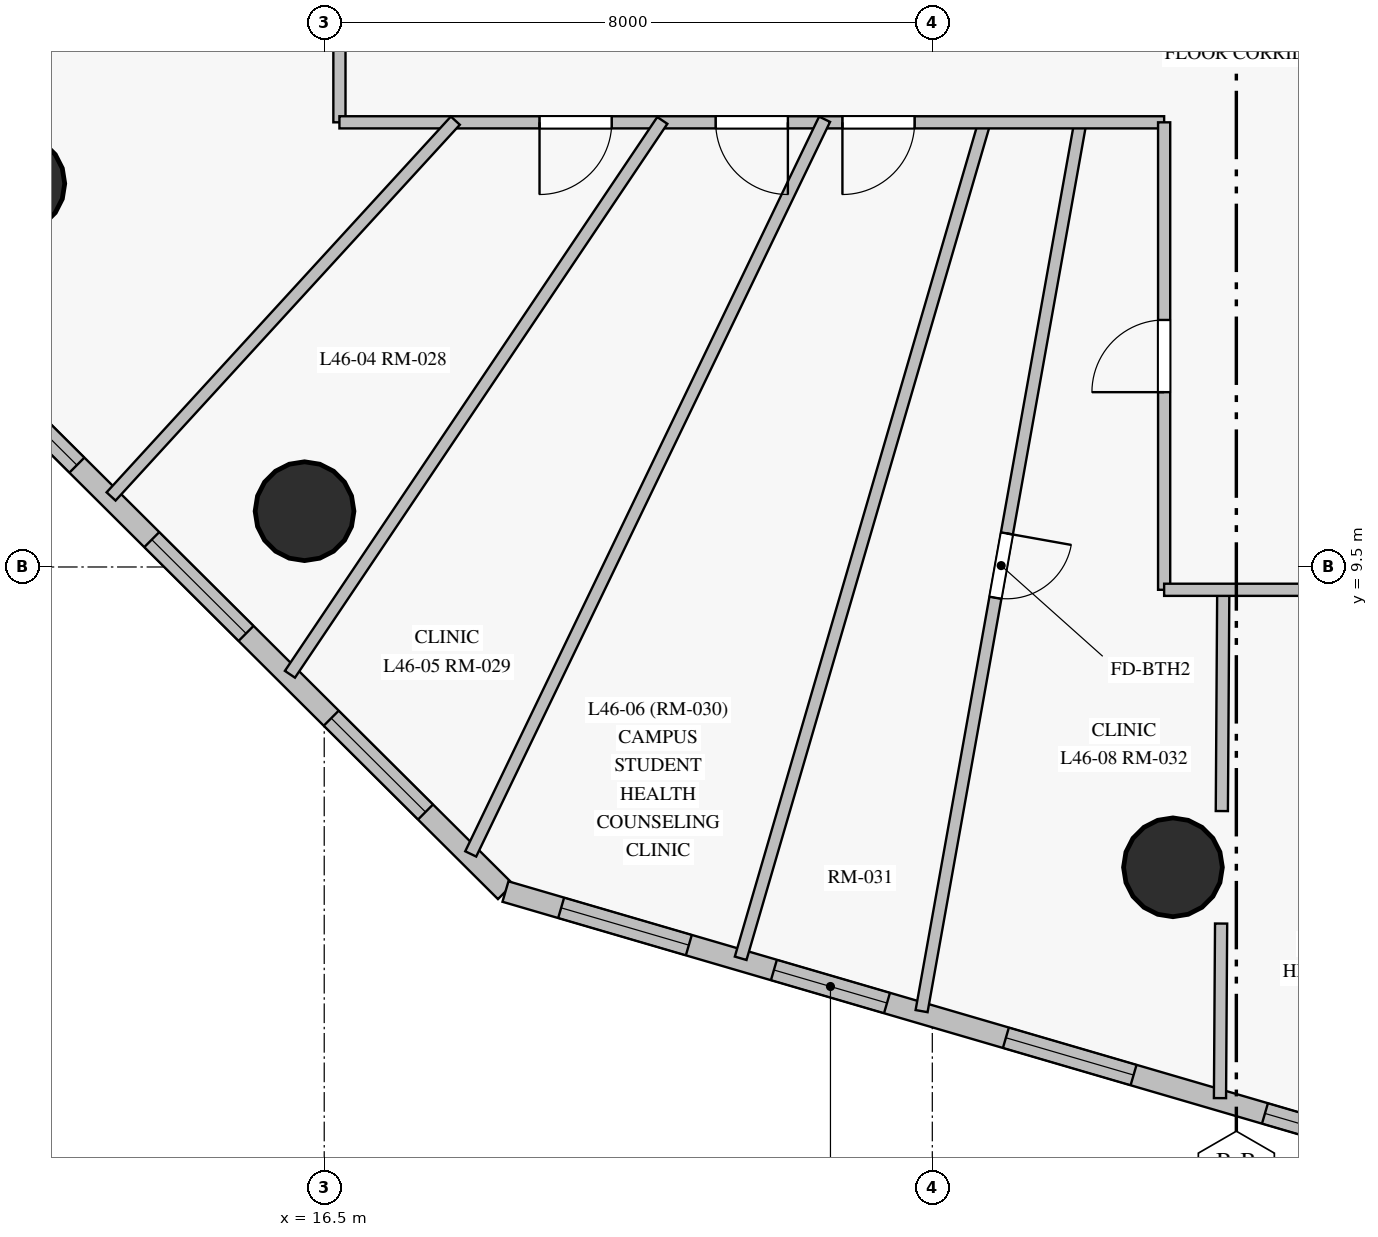
"""IFC4 building model, lengths in metres.
Left out: names, types, materials, properties, quantities, classifications, styles, units other than length and angle.
Written with IfcOpenShell. Run it as: python <this file> out.ifc"""

import sys

from ifc_helpers import new_model, si_unit, direction, frame, frame_2d, origin, origin_with_axes, origin_2d, place, context, subcontext, project, spatial, rectangle, circle, extrude, source, transform, mapped, element, fill, save


model = new_model("IFC4")
c1 = context("Model", 3, precision=1e-05, world=origin(), true_north=direction((0.0, 1.0)))
c2 = subcontext(c1, "Body", "Model", "MODEL_VIEW")
j1 = project(units=[si_unit("LENGTHUNIT", "METRE"), si_unit("PLANEANGLEUNIT", "RADIAN")], contexts=[c1])
p1 = place(None, origin())
s1 = spatial("IfcSite", under=j1, at=p1, CompositionType="ELEMENT")
p2 = place(p1, origin())
s2 = spatial("IfcBuilding", under=s1, at=p2, CompositionType="ELEMENT")
p3 = place(p2, frame((0.0, 0.0, 162.65)))
s3 = spatial("IfcBuildingStorey", under=s2, at=p3, CompositionType="ELEMENT", Elevation=162.65)
m1 = source(origin_with_axes(), c2, "Body", "SweptSolid", [
    extrude(circle(Radius=0.65, at=origin_2d()), origin(), (0.0, 0.0, 1.0), 3.05),
])
for number, where, z_axis, x_axis in (
    (1, (12.436, 14.544, 0.0), (0.0, 0.0, 1.0), (1.0, 0.0, 0.0)),
    (2, (16.241, 10.234, 0.0), (0.0, 0.0, 1.0), (1.0, 0.0, 0.0)),
    (3, (27.666, 5.549, 0.0), (0.0, 0.0, 1.0), (1.0, 0.0, 0.0)),
):
    element("IfcColumn", number, at=place(p3, frame(where, z_axis=z_axis, x_axis=x_axis)), inside=s3, PredefinedType="COLUMN", context=c2, shape_type="MappedRepresentation", body=[
        mapped(m1, transform((0.0, 0.0, 0.0), scale=1.0)),
    ])
p4 = place(p3, frame((12.099, 11.981, 0.0), z_axis=(0.0, 0.0, 1.0), x_axis=(0.708877198621, -0.705331919932, 0.0)))
e4 = element("IfcWall", 4, at=p4, inside=s3, PredefinedType="SOLIDWALL", context=c2, shape_type="SweptSolid", body=[
    extrude(rectangle(XDim=9.572, YDim=0.28, at=frame_2d((4.786, 0.0))), origin(), (0.0, 0.0, 1.0), 2.825),
])
p5 = place(p4, frame((0.668, 0.0, 0.85)))
e5 = element("IfcOpeningElement", 5, at=p5, cuts=e4, PredefinedType="OPENING", context=c2, shape_type="SweptSolid", body=[
    extrude(rectangle(XDim=0.95, YDim=1.5, at=frame_2d((0.475, 0.75))), frame((0.0, 0.15, 0.0), z_axis=(0.0, -1.0, 0.0), x_axis=(1.0, 0.0, 0.0)), (0.0, 0.0, 1.0), 0.3),
])
p6 = place(p4, frame((3.008, 0.0, 0.85)))
e6 = element("IfcOpeningElement", 6, at=p6, cuts=e4, PredefinedType="OPENING", context=c2, shape_type="SweptSolid", body=[
    extrude(rectangle(XDim=1.75, YDim=1.65, at=frame_2d((0.875, 0.825))), frame((0.0, 0.15, 0.0), z_axis=(0.0, -1.0, 0.0), x_axis=(1.0, 0.0, 0.0)), (0.0, 0.0, 1.0), 0.3),
])
p7 = place(p4, frame((6.338, 0.0, 0.85)))
e7 = element("IfcOpeningElement", 7, at=p7, cuts=e4, PredefinedType="OPENING", context=c2, shape_type="SweptSolid", body=[
    extrude(rectangle(XDim=1.75, YDim=1.65, at=frame_2d((0.875, 0.825))), frame((0.0, 0.15, 0.0), z_axis=(0.0, -1.0, 0.0), x_axis=(1.0, 0.0, 0.0)), (0.0, 0.0, 1.0), 0.3),
])
p8 = place(p3, frame((18.885, 5.23, 0.0), z_axis=(0.0, 0.0, 1.0), x_axis=(0.959880587049, -0.280409091519, 0.0)))
e8 = element("IfcWall", 8, at=p8, inside=s3, PredefinedType="SOLIDWALL", context=c2, shape_type="SweptSolid", body=[
    extrude(rectangle(XDim=12.053, YDim=0.28, at=frame_2d((6.027, 0.0))), origin(), (0.0, 0.0, 1.0), 2.825),
])
p9 = place(p8, frame((0.763, 0.0, 0.85)))
e9 = element("IfcOpeningElement", 9, at=p9, cuts=e8, PredefinedType="OPENING", context=c2, shape_type="SweptSolid", body=[
    extrude(rectangle(XDim=1.75, YDim=1.65, at=frame_2d((0.875, 0.825))), frame((0.0, 0.15, 0.0), z_axis=(0.0, -1.0, 0.0), x_axis=(1.0, 0.0, 0.0)), (0.0, 0.0, 1.0), 0.3),
])
p10 = place(p8, frame((3.679, 0.0, 0.85)))
e10 = element("IfcOpeningElement", 10, at=p10, cuts=e8, PredefinedType="OPENING", context=c2, shape_type="SweptSolid", body=[
    extrude(rectangle(XDim=1.55, YDim=1.65, at=frame_2d((0.775, 0.825))), frame((0.0, 0.15, 0.0), z_axis=(0.0, -1.0, 0.0), x_axis=(1.0, 0.0, 0.0)), (0.0, 0.0, 1.0), 0.3),
])
p11 = place(p8, frame((6.859, 0.0, 0.85)))
e11 = element("IfcOpeningElement", 11, at=p11, cuts=e8, PredefinedType="OPENING", context=c2, shape_type="SweptSolid", body=[
    extrude(rectangle(XDim=1.75, YDim=1.65, at=frame_2d((0.875, 0.825))), frame((0.0, 0.15, 0.0), z_axis=(0.0, -1.0, 0.0), x_axis=(1.0, 0.0, 0.0)), (0.0, 0.0, 1.0), 0.3),
])
p12 = place(p8, frame((10.409, 0.0, 0.85)))
e12 = element("IfcOpeningElement", 12, at=p12, cuts=e8, PredefinedType="OPENING", context=c2, shape_type="SweptSolid", body=[
    extrude(rectangle(XDim=0.95, YDim=1.5, at=frame_2d((0.475, 0.75))), frame((0.0, 0.15, 0.0), z_axis=(0.0, -1.0, 0.0), x_axis=(1.0, 0.0, 0.0)), (0.0, 0.0, 1.0), 0.3),
])
p13 = place(p3, frame((16.7, 15.35, 0.0), z_axis=(0.0, 0.0, 1.0), x_axis=(0.0, 1.0, 0.0)))
e13 = element("IfcWall", 13, at=p13, inside=s3, PredefinedType="PARTITIONING", context=c2, shape_type="SweptSolid", body=[
    extrude(rectangle(XDim=22.3, YDim=0.16, at=frame_2d((11.15, 0.0))), origin(), (0.0, 0.0, 1.0), 2.275),
])
p14 = place(p13, frame((11.715, 0.0, 0.0)))
e14 = element("IfcOpeningElement", 14, at=p14, cuts=e13, PredefinedType="OPENING", context=c2, shape_type="SweptSolid", body=[
    extrude(rectangle(XDim=0.95, YDim=2.15, at=frame_2d((0.475, 1.075))), frame((0.0, 0.09, 0.0), z_axis=(0.0, -1.0, 0.0), x_axis=(1.0, 0.0, 0.0)), (0.0, 0.0, 1.0), 0.18),
])
p15 = place(p13, frame((7.33, 0.0, 0.0)))
e15 = element("IfcOpeningElement", 15, at=p15, cuts=e13, PredefinedType="OPENING", context=c2, shape_type="SweptSolid", body=[
    extrude(rectangle(XDim=0.96, YDim=2.15, at=frame_2d((0.48, 1.075))), frame((0.0, 0.09, 0.0), z_axis=(0.0, -1.0, 0.0), x_axis=(1.0, 0.0, 0.0)), (0.0, 0.0, 1.0), 0.18),
])
p16 = place(p13, frame((4.61, 0.0, 0.0)))
e16 = element("IfcOpeningElement", 16, at=p16, cuts=e13, PredefinedType="OPENING", context=c2, shape_type="SweptSolid", body=[
    extrude(rectangle(XDim=0.95, YDim=2.15, at=frame_2d((0.475, 1.075))), frame((0.0, 0.09, 0.0), z_axis=(0.0, -1.0, 0.0), x_axis=(1.0, 0.0, 0.0)), (0.0, 0.0, 1.0), 0.18),
])
p17 = place(p13, frame((16.99, 0.0, 0.0)))
e17 = element("IfcOpeningElement", 17, at=p17, cuts=e13, PredefinedType="OPENING", context=c2, shape_type="SweptSolid", body=[
    extrude(rectangle(XDim=0.95, YDim=2.15, at=frame_2d((0.475, 1.075))), frame((0.0, 0.09, 0.0), z_axis=(0.0, -1.0, 0.0), x_axis=(1.0, 0.0, 0.0)), (0.0, 0.0, 1.0), 0.18),
])
p18 = place(p13, frame((14.56, 0.0, 0.0)))
e18 = element("IfcOpeningElement", 18, at=p18, cuts=e13, PredefinedType="OPENING", context=c2, shape_type="SweptSolid", body=[
    extrude(rectangle(XDim=0.95, YDim=2.15, at=frame_2d((0.475, 1.075))), frame((0.0, 0.09, 0.0), z_axis=(0.0, -1.0, 0.0), x_axis=(1.0, 0.0, 0.0)), (0.0, 0.0, 1.0), 0.18),
])
p19 = place(p13, frame((13.43, 0.0, 0.0)))
e19 = element("IfcOpeningElement", 19, at=p19, cuts=e13, PredefinedType="OPENING", context=c2, shape_type="SweptSolid", body=[
    extrude(rectangle(XDim=0.95, YDim=2.15, at=frame_2d((0.475, 1.075))), frame((0.0, 0.09, 0.0), z_axis=(0.0, -1.0, 0.0), x_axis=(1.0, 0.0, 0.0)), (0.0, 0.0, 1.0), 0.18),
])
p20 = place(p3, frame((26.453, 15.379, 0.0), z_axis=(0.0, 0.0, 1.0), x_axis=(-0.175848115547, -0.984417310016, 0.0)))
e20 = element("IfcWall", 20, at=p20, inside=s3, PredefinedType="PARTITIONING", context=c2, shape_type="SweptSolid", body=[
    extrude(rectangle(XDim=11.908, YDim=0.16, at=frame_2d((5.954, 0.0))), origin(), (0.0, 0.0, 1.0), 2.275),
])
p21 = place(p20, frame((5.524, 0.0, 0.0)))
e21 = element("IfcOpeningElement", 21, at=p21, cuts=e20, PredefinedType="OPENING", context=c2, shape_type="SweptSolid", body=[
    extrude(rectangle(XDim=0.86, YDim=2.04, at=frame_2d((0.43, 1.02))), frame((0.0, 0.09, 0.0), z_axis=(0.0, -1.0, 0.0), x_axis=(1.0, 0.0, 0.0)), (0.0, 0.0, 1.0), 0.18),
])
p22 = place(p3, frame((25.194, 15.379, 0.0), z_axis=(0.0, 0.0, 1.0), x_axis=(-0.279952660007, -0.960013806231, 0.0)))
e22 = element("IfcWall", 22, at=p22, inside=s3, PredefinedType="PARTITIONING", context=c2, shape_type="SweptSolid", body=[
    extrude(rectangle(XDim=11.486, YDim=0.16, at=frame_2d((5.743, 0.0))), origin(), (0.0, 0.0, 1.0), 2.825),
])
p23 = place(p3, frame((27.55, 15.35, 0.0), z_axis=(0.0, 0.0, 1.0), x_axis=(-1.0, 0.0, 0.0)))
e23 = element("IfcWall", 23, at=p23, inside=s3, PredefinedType="PARTITIONING", context=c2, shape_type="SweptSolid", body=[
    extrude(rectangle(XDim=10.85, YDim=0.16, at=frame_2d((5.425, 0.0))), origin(), (0.0, 0.0, 1.0), 2.375),
])
p24 = place(p23, frame((7.268, 0.0, 0.0)))
e24 = element("IfcOpeningElement", 24, at=p24, cuts=e23, PredefinedType="OPENING", context=c2, shape_type="SweptSolid", body=[
    extrude(rectangle(XDim=0.95, YDim=2.15, at=frame_2d((0.475, 1.075))), frame((0.0, 0.09, 0.0), z_axis=(0.0, -1.0, 0.0), x_axis=(1.0, 0.0, 0.0)), (0.0, 0.0, 1.0), 0.18),
])
p25 = place(p23, frame((4.95, 0.0, 0.0)))
e25 = element("IfcOpeningElement", 25, at=p25, cuts=e23, PredefinedType="OPENING", context=c2, shape_type="SweptSolid", body=[
    extrude(rectangle(XDim=0.95, YDim=2.15, at=frame_2d((0.475, 1.075))), frame((0.0, 0.09, 0.0), z_axis=(0.0, -1.0, 0.0), x_axis=(1.0, 0.0, 0.0)), (0.0, 0.0, 1.0), 0.18),
])
p26 = place(p23, frame((3.282, 0.0, 0.0)))
e26 = element("IfcOpeningElement", 26, at=p26, cuts=e23, PredefinedType="OPENING", context=c2, shape_type="SweptSolid", body=[
    extrude(rectangle(XDim=0.95, YDim=2.15, at=frame_2d((0.475, 1.075))), frame((0.0, 0.09, 0.0), z_axis=(0.0, -1.0, 0.0), x_axis=(1.0, 0.0, 0.0)), (0.0, 0.0, 1.0), 0.18),
])
p27 = place(p3, frame((23.083, 15.39, 0.0), z_axis=(0.0, 0.0, 1.0), x_axis=(-0.433938094177, -0.900942689866, 0.0)))
e27 = element("IfcWall", 27, at=p27, inside=s3, PredefinedType="PARTITIONING", context=c2, shape_type="SweptSolid", body=[
    extrude(rectangle(XDim=10.728, YDim=0.16, at=frame_2d((5.364, 0.0))), origin(), (0.0, 0.0, 1.0), 2.825),
])
p28 = place(p3, frame((20.948, 15.375, 0.0), z_axis=(0.0, 0.0, 1.0), x_axis=(-0.557961935119, -0.82986654286, 0.0)))
e28 = element("IfcWall", 28, at=p28, inside=s3, PredefinedType="PARTITIONING", context=c2, shape_type="SweptSolid", body=[
    extrude(rectangle(XDim=8.781, YDim=0.16, at=frame_2d((4.39, 0.0))), origin(), (0.0, 0.0, 1.0), 2.825),
])
p29 = place(p3, frame((18.225, 15.372, 0.0), z_axis=(0.0, 0.0, 1.0), x_axis=(-0.675498710577, -0.737361167955, 0.0)))
e29 = element("IfcWall", 29, at=p29, inside=s3, PredefinedType="PARTITIONING", context=c2, shape_type="SweptSolid", body=[
    extrude(rectangle(XDim=6.705, YDim=0.16, at=frame_2d((3.353, 0.0))), origin(), (0.0, 0.0, 1.0), 2.275),
])
p30 = place(p3, frame((27.55, 9.2, 0.0), z_axis=(0.0, 0.0, 1.0), x_axis=(0.0, 1.0, 0.0)))
e30 = element("IfcWall", 30, at=p30, inside=s3, PredefinedType="PARTITIONING", context=c2, shape_type="SweptSolid", body=[
    extrude(rectangle(XDim=6.15, YDim=0.16, at=frame_2d((3.075, 0.0))), origin(), (0.0, 0.0, 1.0), 2.275),
])
p31 = place(p30, frame((2.6, 0.0, 0.0)))
e31 = element("IfcOpeningElement", 31, at=p31, cuts=e30, PredefinedType="OPENING", context=c2, shape_type="SweptSolid", body=[
    extrude(rectangle(XDim=0.95, YDim=2.15, at=frame_2d((0.475, 1.075))), frame((0.0, 0.09, 0.0), z_axis=(0.0, -1.0, 0.0), x_axis=(1.0, 0.0, 0.0)), (0.0, 0.0, 1.0), 0.18),
])
p32 = place(p3, frame((28.328, 9.23, 0.0), z_axis=(0.0, 0.0, 1.0), x_axis=(-0.006475042741, -0.999979036691, 0.0)))
e32 = element("IfcWall", 32, at=p32, inside=s3, PredefinedType="PARTITIONING", context=c2, shape_type="SweptSolid", body=[
    extrude(rectangle(XDim=2.941, YDim=0.16, at=frame_2d((1.47, 0.0))), origin(), (0.0, 0.0, 1.0), 2.825),
])
p33 = place(p3, frame((28.3, 4.809, 0.0), z_axis=(0.0, 0.0, 1.0), x_axis=(-0.006484396464, -0.99997897608, 0.0)))
e33 = element("IfcWall", 33, at=p33, inside=s3, PredefinedType="PARTITIONING", context=c2, shape_type="SweptSolid", body=[
    extrude(rectangle(XDim=2.297, YDim=0.16, at=frame_2d((1.148, 0.0))), origin(), (0.0, 0.0, 1.0), 2.825),
])
p34 = place(p3, frame((29.55, 9.2, 0.0), z_axis=(0.0, 0.0, 1.0), x_axis=(-1.0, 0.0, 0.0)))
e34 = element("IfcWall", 34, at=p34, inside=s3, PredefinedType="PARTITIONING", context=c2, shape_type="SweptSolid", body=[
    extrude(rectangle(XDim=2.0, YDim=0.16, at=frame_2d((1.0, 0.0))), origin(), (0.0, 0.0, 1.0), 2.495),
])
m2 = source(origin_with_axes(), c2, "Body", "SweptSolid", [
    extrude(rectangle(XDim=0.95, YDim=1.5, at=frame_2d((0.475, 0.75))), frame((0.0, 0.03, 0.0), z_axis=(0.0, -1.0, 0.0), x_axis=(1.0, 0.0, 0.0)), (0.0, 0.0, 1.0), 0.06),
])
p35 = place(p5, origin())
e35 = element("IfcWindow", 35, at=p35, inside=s3, PartitioningType="SINGLE_PANEL", PredefinedType="WINDOW", context=c2, shape_type="MappedRepresentation", body=[
    mapped(m2, transform((0.0, 0.0, 0.0), scale=1.0)),
])
fill(e5, e35)
m3 = source(origin_with_axes(), c2, "Body", "SweptSolid", [
    extrude(rectangle(XDim=1.75, YDim=1.65, at=frame_2d((0.875, 0.825))), frame((0.0, 0.03, 0.0), z_axis=(0.0, -1.0, 0.0), x_axis=(1.0, 0.0, 0.0)), (0.0, 0.0, 1.0), 0.06),
])
p36 = place(p6, origin())
e36 = element("IfcWindow", 36, at=p36, inside=s3, PartitioningType="SINGLE_PANEL", PredefinedType="WINDOW", context=c2, shape_type="MappedRepresentation", body=[
    mapped(m3, transform((0.0, 0.0, 0.0), scale=1.0)),
])
fill(e6, e36)
p37 = place(p7, origin())
e37 = element("IfcWindow", 37, at=p37, inside=s3, PartitioningType="SINGLE_PANEL", PredefinedType="WINDOW", context=c2, shape_type="MappedRepresentation", body=[
    mapped(m3, transform((0.0, 0.0, 0.0), scale=1.0)),
])
fill(e7, e37)
p38 = place(p9, origin())
e38 = element("IfcWindow", 38, at=p38, inside=s3, PartitioningType="SINGLE_PANEL", PredefinedType="WINDOW", context=c2, shape_type="MappedRepresentation", body=[
    mapped(m3, transform((0.0, 0.0, 0.0), scale=1.0)),
])
fill(e9, e38)
m4 = source(origin_with_axes(), c2, "Body", "SweptSolid", [
    extrude(rectangle(XDim=1.55, YDim=1.65, at=frame_2d((0.775, 0.825))), frame((0.0, 0.03, 0.0), z_axis=(0.0, -1.0, 0.0), x_axis=(1.0, 0.0, 0.0)), (0.0, 0.0, 1.0), 0.06),
])
p39 = place(p10, origin())
e39 = element("IfcWindow", 39, at=p39, inside=s3, PartitioningType="SINGLE_PANEL", PredefinedType="WINDOW", context=c2, shape_type="MappedRepresentation", body=[
    mapped(m4, transform((0.0, 0.0, 0.0), scale=1.0)),
])
fill(e10, e39)
p40 = place(p11, origin())
e40 = element("IfcWindow", 40, at=p40, inside=s3, PartitioningType="SINGLE_PANEL", PredefinedType="WINDOW", context=c2, shape_type="MappedRepresentation", body=[
    mapped(m3, transform((0.0, 0.0, 0.0), scale=1.0)),
])
fill(e11, e40)
p41 = place(p12, origin())
e41 = element("IfcWindow", 41, at=p41, inside=s3, PartitioningType="SINGLE_PANEL", PredefinedType="WINDOW", context=c2, shape_type="MappedRepresentation", body=[
    mapped(m2, transform((0.0, 0.0, 0.0), scale=1.0)),
])
fill(e12, e41)
m5 = source(origin_with_axes(), c2, "Body", "SweptSolid", [
    extrude(rectangle(XDim=0.95, YDim=2.15, at=frame_2d((0.475, 1.075))), frame((0.0, 0.025, 0.0), z_axis=(0.0, -1.0, 0.0), x_axis=(1.0, 0.0, 0.0)), (0.0, 0.0, 1.0), 0.05),
])
p42 = place(p24, origin())
e42 = element("IfcDoor", 42, at=p42, inside=s3, OperationType="SINGLE_SWING_RIGHT", PredefinedType="DOOR", context=c2, shape_type="MappedRepresentation", body=[
    mapped(m5, transform((0.0, 0.0, 0.0), scale=1.0)),
])
fill(e24, e42)
p43 = place(p25, origin())
e43 = element("IfcDoor", 43, at=p43, inside=s3, OperationType="SINGLE_SWING_LEFT", PredefinedType="DOOR", context=c2, shape_type="MappedRepresentation", body=[
    mapped(m5, transform((0.0, 0.0, 0.0), scale=1.0)),
])
fill(e25, e43)
p44 = place(p26, origin())
e44 = element("IfcDoor", 44, at=p44, inside=s3, OperationType="SINGLE_SWING_RIGHT", PredefinedType="DOOR", context=c2, shape_type="MappedRepresentation", body=[
    mapped(m5, transform((0.0, 0.0, 0.0), scale=1.0)),
])
fill(e26, e44)
p45 = place(p31, origin())
e45 = element("IfcDoor", 45, at=p45, inside=s3, OperationType="SINGLE_SWING_LEFT", PredefinedType="DOOR", context=c2, shape_type="MappedRepresentation", body=[
    mapped(m5, transform((0.0, 0.0, 0.0), scale=1.0)),
])
fill(e31, e45)
m6 = source(origin_with_axes(), c2, "Body", "SweptSolid", [
    extrude(rectangle(XDim=0.86, YDim=2.04, at=frame_2d((0.43, 1.02))), frame((0.0, 0.025, 0.0), z_axis=(0.0, -1.0, 0.0), x_axis=(1.0, 0.0, 0.0)), (0.0, 0.0, 1.0), 0.05),
])
p46 = place(p21, origin())
e46 = element("IfcDoor", 46, at=p46, inside=s3, OperationType="SINGLE_SWING_LEFT", PredefinedType="DOOR", context=c2, shape_type="MappedRepresentation", body=[
    mapped(m6, transform((0.0, 0.0, 0.0), scale=1.0)),
])
fill(e21, e46)
save(model, sys.argv[1])
